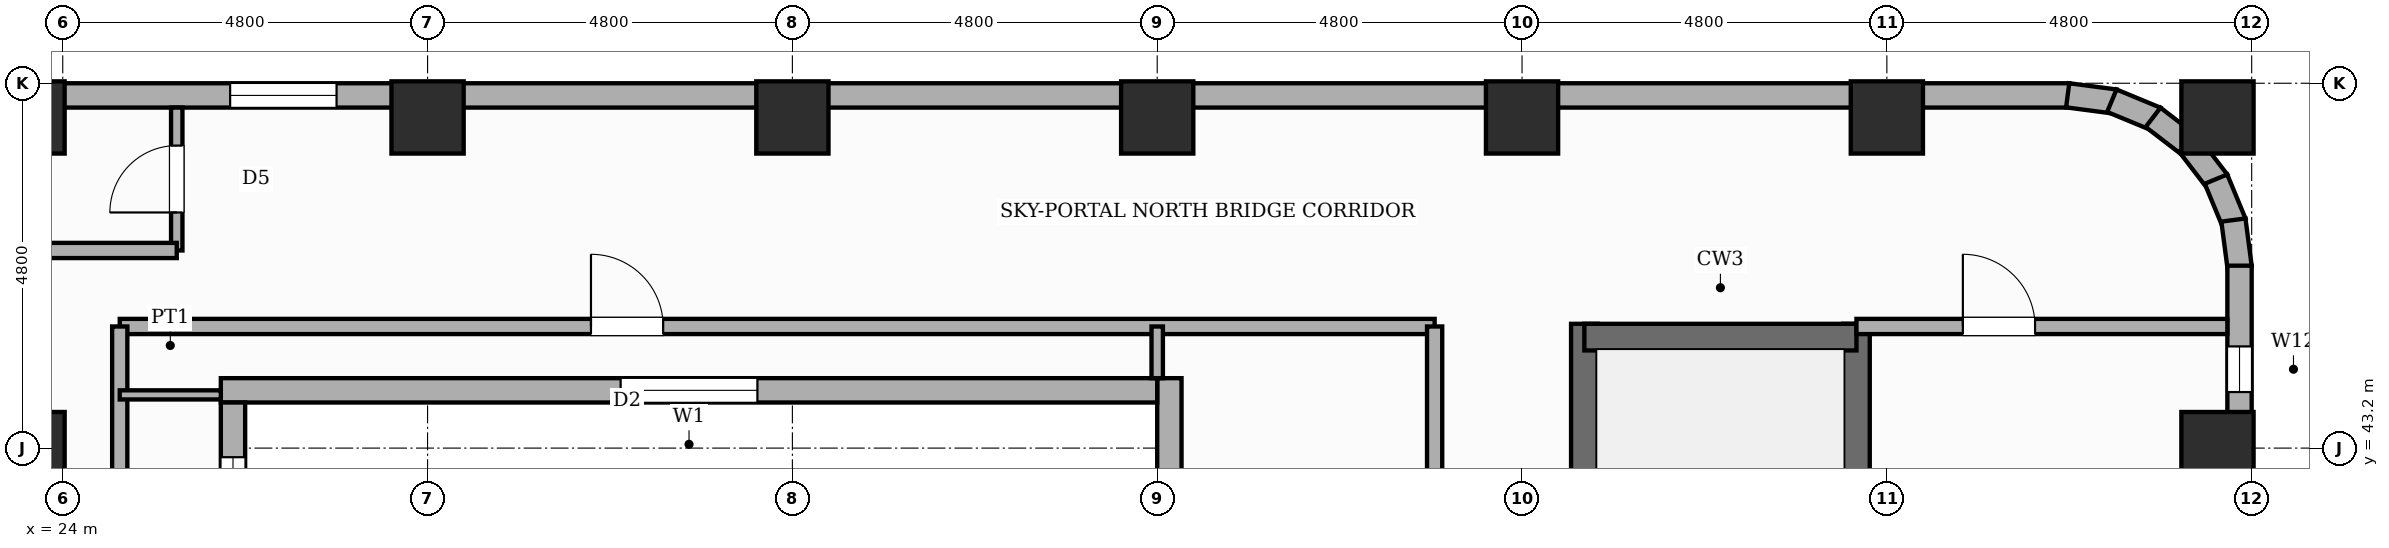
"""IFC4 building model, lengths in metres.
Left out: names, types, materials, properties, quantities, classifications, styles, units other than length and angle.
Written with IfcOpenShell. Run it as: python <this file> out.ifc"""

import sys

from ifc_helpers import new_model, si_unit, direction, frame, frame_2d, origin, origin_2d, place, context, subcontext, project, spatial, rectangle, extrude, element, fill, save


model = new_model("IFC4")
c1 = context("Model", 3, precision=1e-05, world=origin(), true_north=direction((0.0, 1.0)))
c2 = subcontext(c1, "Body", "Model", "MODEL_VIEW")
j1 = project(units=[si_unit("LENGTHUNIT", "METRE"), si_unit("PLANEANGLEUNIT", "RADIAN")], contexts=[c1])
p1 = place(None, origin())
s1 = spatial("IfcSite", under=j1, at=p1, CompositionType="ELEMENT")
p2 = place(p1, origin())
s2 = spatial("IfcBuilding", under=s1, at=p2, CompositionType="ELEMENT")
p3 = place(p2, frame((0.0, 0.0, 107.2)))
s3 = spatial("IfcBuildingStorey", under=s2, at=p3, CompositionType="ELEMENT", Elevation=107.2)
p4 = place(p3, frame((44.02, 35.865, 0.0), z_axis=(0.0, 0.0, 1.0), x_axis=(0.0, 1.0, 0.0)))
e1 = element("IfcWall", 1, at=p4, inside=s3, PredefinedType="SHEAR", context=c2, shape_type="SweptSolid", body=[
    extrude(rectangle(XDim=8.97, YDim=0.35, at=frame_2d((4.485, 0.0))), origin(), (0.0, 0.0, 1.0), 3.6),
])
p5 = place(p4, frame((0.65, 0.0, 0.0)))
e2 = element("IfcOpeningElement", 2, at=p5, cuts=e1, PredefinedType="OPENING", context=c2, shape_type="SweptSolid", body=[
    extrude(rectangle(XDim=0.95, YDim=2.1, at=frame_2d((0.475, 1.05))), frame((0.0, 0.185, 0.0), z_axis=(0.0, -1.0, 0.0), x_axis=(1.0, 0.0, 0.0)), (0.0, 0.0, 1.0), 0.37),
])
p6 = place(p3, frame((47.6, 35.865, 0.0), z_axis=(0.0, 0.0, 1.0), x_axis=(0.0, 1.0, 0.0)))
e3 = element("IfcWall", 3, at=p6, inside=s3, PredefinedType="SHEAR", context=c2, shape_type="SweptSolid", body=[
    extrude(rectangle(XDim=8.97, YDim=0.35, at=frame_2d((4.485, 0.0))), origin(), (0.0, 0.0, 1.0), 3.6),
])
p7 = place(p3, frame((44.02, 44.66, 0.0), z_axis=(0.0, 0.0, 1.0), x_axis=(1.0, 0.0, 0.0)))
e4 = element("IfcWall", 4, at=p7, inside=s3, PredefinedType="SHEAR", context=c2, shape_type="SweptSolid", body=[
    extrude(rectangle(XDim=3.58, YDim=0.35, at=frame_2d((1.79, 0.0))), origin(), (0.0, 0.0, 1.0), 3.6),
])
for number, where, z_axis, x_axis in (
    (5, (23.55, 43.2, 0.0), (0.0, 0.0, 1.0), (1.0, 0.0, 0.0)),
    (6, (23.55, 47.55, 0.0), (0.0, 0.0, 1.0), (1.0, 0.0, 0.0)),
    (7, (28.8, 47.55, 0.0), (0.0, 0.0, 1.0), (1.0, 0.0, 0.0)),
    (8, (33.6, 47.55, 0.0), (0.0, 0.0, 1.0), (1.0, 0.0, 0.0)),
    (9, (38.4, 47.55, 0.0), (0.0, 0.0, 1.0), (1.0, 0.0, 0.0)),
    (10, (43.2, 47.55, 0.0), (0.0, 0.0, 1.0), (1.0, 0.0, 0.0)),
    (11, (48.0, 47.55, 0.0), (0.0, 0.0, 1.0), (1.0, 0.0, 0.0)),
    (12, (52.35, 43.2, 0.0), (0.0, 0.0, 1.0), (1.0, 0.0, 0.0)),
    (13, (52.35, 47.55, 0.0), (0.0, 0.0, 1.0), (1.0, 0.0, 0.0)),
):
    element("IfcColumn", number, at=place(p3, frame(where, z_axis=z_axis, x_axis=x_axis)), inside=s3, PredefinedType="COLUMN", context=c2, shape_type="SweptSolid", body=[
        extrude(rectangle(XDim=0.95, YDim=0.95, at=origin_2d()), origin(), (0.0, 0.0, 1.0), 3.6),
    ])
p8 = place(p3, frame((7.2, 47.84, 0.0), z_axis=(0.0, 0.0, 1.0), x_axis=(1.0, 0.0, 0.0)))
e14 = element("IfcWall", 14, at=p8, inside=s3, PredefinedType="STANDARD", context=c2, shape_type="SweptSolid", body=[
    extrude(rectangle(XDim=43.2, YDim=0.32, at=frame_2d((21.6, 0.0))), origin(), (0.0, 0.0, 1.0), 2.54),
])
p9 = place(p8, frame((19.002, 0.0, 0.65)))
e15 = element("IfcOpeningElement", 15, at=p9, cuts=e14, PredefinedType="OPENING", context=c2, shape_type="SweptSolid", body=[
    extrude(rectangle(XDim=1.4, YDim=1.1, at=frame_2d((0.7, 0.55))), frame((0.0, 0.17, 0.0), z_axis=(0.0, -1.0, 0.0), x_axis=(1.0, 0.0, 0.0)), (0.0, 0.0, 1.0), 0.34),
])
p10 = place(p8, frame((0.282, 0.0, 0.65)))
e16 = element("IfcOpeningElement", 16, at=p10, cuts=e14, PredefinedType="OPENING", context=c2, shape_type="SweptSolid", body=[
    extrude(rectangle(XDim=1.4, YDim=1.1, at=frame_2d((0.7, 0.55))), frame((0.0, 0.17, 0.0), z_axis=(0.0, -1.0, 0.0), x_axis=(1.0, 0.0, 0.0)), (0.0, 0.0, 1.0), 0.34),
])
p11 = place(p8, frame((9.853, 0.0, 0.65)))
e17 = element("IfcOpeningElement", 17, at=p11, cuts=e14, PredefinedType="OPENING", context=c2, shape_type="SweptSolid", body=[
    extrude(rectangle(XDim=1.4, YDim=1.1, at=frame_2d((0.7, 0.55))), frame((0.0, 0.17, 0.0), z_axis=(0.0, -1.0, 0.0), x_axis=(1.0, 0.0, 0.0)), (0.0, 0.0, 1.0), 0.34),
])
for number, where, z_axis, x_axis in (
    (18, (50.379, 47.841, 0.0), (0.0, 0.0, 1.0), (0.991, -0.131, 0.0)),
    (19, (50.96, 47.771, 0.0), (0.0, 0.0, 1.0), (0.924, -0.383, 0.0)),
    (20, (51.503, 47.552, 0.0), (0.0, 0.0, 1.0), (0.793, -0.609, 0.0)),
    (21, (51.97, 47.2, 0.0), (0.0, 0.0, 1.0), (0.609, -0.793, 0.0)),
    (22, (52.331, 46.739, 0.0), (0.0, 0.0, 1.0), (0.382, -0.924, 0.0)),
    (23, (52.56, 46.2, 0.0), (0.0, 0.0, 1.0), (0.131, -0.991, 0.0)),
):
    element("IfcWall", number, at=place(p3, frame(where, z_axis=z_axis, x_axis=x_axis)), inside=s3, PredefinedType="STANDARD", context=c2, shape_type="SweptSolid", body=[
        extrude(rectangle(XDim=0.626, YDim=0.32, at=frame_2d((0.313, 0.0))), origin(), (0.0, 0.0, 1.0), 2.54),
    ])
p12 = place(p3, frame((52.64, 45.6, 0.0), z_axis=(0.0, 0.0, 1.0), x_axis=(0.0, -1.0, 0.0)))
e24 = element("IfcWall", 24, at=p12, inside=s3, PredefinedType="STANDARD", context=c2, shape_type="SweptSolid", body=[
    extrude(rectangle(XDim=14.4, YDim=0.32, at=frame_2d((7.2, 0.0))), origin(), (0.0, 0.0, 1.0), 2.54),
])
p13 = place(p12, frame((1.062, 0.0, 0.45)))
e25 = element("IfcOpeningElement", 25, at=p13, cuts=e24, PredefinedType="OPENING", context=c2, shape_type="SweptSolid", body=[
    extrude(rectangle(XDim=0.6, YDim=1.8, at=frame_2d((0.3, 0.9))), frame((0.0, 0.17, 0.0), z_axis=(0.0, -1.0, 0.0), x_axis=(1.0, 0.0, 0.0)), (0.0, 0.0, 1.0), 0.34),
])
p14 = place(p12, frame((9.452, 0.0, 0.65)))
e26 = element("IfcOpeningElement", 26, at=p14, cuts=e24, PredefinedType="OPENING", context=c2, shape_type="SweptSolid", body=[
    extrude(rectangle(XDim=1.4, YDim=1.1, at=frame_2d((0.7, 0.55))), frame((0.0, 0.17, 0.0), z_axis=(0.0, -1.0, 0.0), x_axis=(1.0, 0.0, 0.0)), (0.0, 0.0, 1.0), 0.34),
])
p15 = place(p3, frame((38.56, 28.8, 0.0), z_axis=(0.0, 0.0, 1.0), x_axis=(0.0, 1.0, 0.0)))
e27 = element("IfcWall", 27, at=p15, inside=s3, PredefinedType="STANDARD", context=c2, shape_type="SweptSolid", body=[
    extrude(rectangle(XDim=15.32, YDim=0.32, at=frame_2d((7.66, 0.0))), origin(), (0.0, 0.0, 1.0), 3.36),
])
p16 = place(p15, frame((9.89, 0.0, 0.8)))
e28 = element("IfcOpeningElement", 28, at=p16, cuts=e27, PredefinedType="OPENING", context=c2, shape_type="SweptSolid", body=[
    extrude(rectangle(XDim=1.8, YDim=2.1, at=frame_2d((0.9, 1.05))), frame((0.0, 0.17, 0.0), z_axis=(0.0, -1.0, 0.0), x_axis=(1.0, 0.0, 0.0)), (0.0, 0.0, 1.0), 0.34),
])
p17 = place(p15, frame((2.805, 0.0, 0.8)))
e29 = element("IfcOpeningElement", 29, at=p17, cuts=e27, PredefinedType="OPENING", context=c2, shape_type="SweptSolid", body=[
    extrude(rectangle(XDim=1.8, YDim=2.1, at=frame_2d((0.9, 1.05))), frame((0.0, 0.17, 0.0), z_axis=(0.0, -1.0, 0.0), x_axis=(1.0, 0.0, 0.0)), (0.0, 0.0, 1.0), 0.34),
])
p18 = place(p3, frame((38.4, 43.96, 0.0), z_axis=(0.0, 0.0, 1.0), x_axis=(-1.0, 0.0, 0.0)))
e30 = element("IfcWall", 30, at=p18, inside=s3, PredefinedType="STANDARD", context=c2, shape_type="SweptSolid", body=[
    extrude(rectangle(XDim=12.32, YDim=0.32, at=frame_2d((6.16, 0.0))), origin(), (0.0, 0.0, 1.0), 3.36),
])
p19 = place(p18, frame((5.26, 0.0, 0.8)))
e31 = element("IfcOpeningElement", 31, at=p19, cuts=e30, PredefinedType="OPENING", context=c2, shape_type="SweptSolid", body=[
    extrude(rectangle(XDim=1.8, YDim=2.1, at=frame_2d((0.9, 1.05))), frame((0.0, 0.17, 0.0), z_axis=(0.0, -1.0, 0.0), x_axis=(1.0, 0.0, 0.0)), (0.0, 0.0, 1.0), 0.34),
])
p20 = place(p3, frame((26.24, 43.8, 0.0), z_axis=(0.0, 0.0, 1.0), x_axis=(0.0, -1.0, 0.0)))
e32 = element("IfcWall", 32, at=p20, inside=s3, PredefinedType="STANDARD", context=c2, shape_type="SweptSolid", body=[
    extrude(rectangle(XDim=15.0, YDim=0.32, at=frame_2d((7.5, 0.0))), origin(), (0.0, 0.0, 1.0), 3.36),
])
p21 = place(p20, frame((7.665, 0.0, 0.8)))
e33 = element("IfcOpeningElement", 33, at=p21, cuts=e32, PredefinedType="OPENING", context=c2, shape_type="SweptSolid", body=[
    extrude(rectangle(XDim=1.8, YDim=2.1, at=frame_2d((0.9, 1.05))), frame((0.0, 0.17, 0.0), z_axis=(0.0, -1.0, 0.0), x_axis=(1.0, 0.0, 0.0)), (0.0, 0.0, 1.0), 0.34),
])
p22 = place(p20, frame((0.72, 0.0, 0.8)))
e34 = element("IfcOpeningElement", 34, at=p22, cuts=e32, PredefinedType="OPENING", context=c2, shape_type="SweptSolid", body=[
    extrude(rectangle(XDim=1.8, YDim=2.1, at=frame_2d((0.9, 1.05))), frame((0.0, 0.17, 0.0), z_axis=(0.0, -1.0, 0.0), x_axis=(1.0, 0.0, 0.0)), (0.0, 0.0, 1.0), 0.34),
])
p23 = place(p3, frame((25.5, 45.8, 0.0), z_axis=(0.0, 0.0, 1.0), x_axis=(0.0, 1.0, 0.0)))
e35 = element("IfcWall", 35, at=p23, inside=s3, PredefinedType="PARTITIONING", context=c2, shape_type="SweptSolid", body=[
    extrude(rectangle(XDim=1.88, YDim=0.15, at=frame_2d((0.94, 0.0))), origin(), (0.0, 0.0, 1.0), 3.36),
])
p24 = place(p23, frame((0.5, 0.0, 0.0)))
e36 = element("IfcOpeningElement", 36, at=p24, cuts=e35, PredefinedType="OPENING", context=c2, shape_type="SweptSolid", body=[
    extrude(rectangle(XDim=0.88, YDim=2.1, at=frame_2d((0.44, 1.05))), frame((0.0, 0.085, 0.0), z_axis=(0.0, -1.0, 0.0), x_axis=(1.0, 0.0, 0.0)), (0.0, 0.0, 1.0), 0.17),
])
p25 = place(p3, frame((22.75, 45.8, 0.0), z_axis=(0.0, 0.0, 1.0), x_axis=(1.0, 0.0, 0.0)))
e37 = element("IfcWall", 37, at=p25, inside=s3, PredefinedType="PARTITIONING", context=c2, shape_type="SweptSolid", body=[
    extrude(rectangle(XDim=2.75, YDim=0.2, at=frame_2d((1.375, 0.0))), origin(), (0.0, 0.0, 1.0), 3.36),
])
p26 = place(p3, frame((24.75, 44.8, 0.0), z_axis=(0.0, 0.0, 1.0), x_axis=(1.0, 0.0, 0.0)))
e38 = element("IfcWall", 38, at=p26, inside=s3, PredefinedType="PARTITIONING", context=c2, shape_type="SweptSolid", body=[
    extrude(rectangle(XDim=17.3, YDim=0.2, at=frame_2d((8.65, 0.0))), origin(), (0.0, 0.0, 1.0), 3.36),
])
p27 = place(p26, frame((6.2, 0.0, 0.0)))
e39 = element("IfcOpeningElement", 39, at=p27, cuts=e38, PredefinedType="OPENING", context=c2, shape_type="SweptSolid", body=[
    extrude(rectangle(XDim=0.95, YDim=2.15, at=frame_2d((0.475, 1.075))), frame((0.0, 0.11, 0.0), z_axis=(0.0, -1.0, 0.0), x_axis=(1.0, 0.0, 0.0)), (0.0, 0.0, 1.0), 0.22),
])
p28 = place(p3, frame((38.4, 44.12, 0.0), z_axis=(0.0, 0.0, 1.0), x_axis=(0.0, 1.0, 0.0)))
e40 = element("IfcWall", 40, at=p28, inside=s3, PredefinedType="PARTITIONING", context=c2, shape_type="SweptSolid", body=[
    extrude(rectangle(XDim=0.68, YDim=0.15, at=frame_2d((0.34, 0.0))), origin(), (0.0, 0.0, 1.0), 3.36),
])
p29 = place(p3, frame((47.6, 44.8, 0.0), z_axis=(0.0, 0.0, 1.0), x_axis=(1.0, 0.0, 0.0)))
e41 = element("IfcWall", 41, at=p29, inside=s3, PredefinedType="PARTITIONING", context=c2, shape_type="SweptSolid", body=[
    extrude(rectangle(XDim=4.88, YDim=0.2, at=frame_2d((2.44, 0.0))), origin(), (0.0, 0.0, 1.0), 3.36),
])
p30 = place(p29, frame((1.4, 0.0, 0.0)))
e42 = element("IfcOpeningElement", 42, at=p30, cuts=e41, PredefinedType="OPENING", context=c2, shape_type="SweptSolid", body=[
    extrude(rectangle(XDim=0.95, YDim=2.15, at=frame_2d((0.475, 1.075))), frame((0.0, 0.11, 0.0), z_axis=(0.0, -1.0, 0.0), x_axis=(1.0, 0.0, 0.0)), (0.0, 0.0, 1.0), 0.22),
])
p31 = place(p3, frame((24.75, 40.6, 0.0), z_axis=(0.0, 0.0, 1.0), x_axis=(0.0, 1.0, 0.0)))
e43 = element("IfcWall", 43, at=p31, inside=s3, PredefinedType="PARTITIONING", context=c2, shape_type="SweptSolid", body=[
    extrude(rectangle(XDim=4.2, YDim=0.2, at=frame_2d((2.1, 0.0))), origin(), (0.0, 0.0, 1.0), 3.36),
])
p32 = place(p31, frame((1.0, 0.0, 0.0)))
e44 = element("IfcOpeningElement", 44, at=p32, cuts=e43, PredefinedType="OPENING", context=c2, shape_type="SweptSolid", body=[
    extrude(rectangle(XDim=0.86, YDim=2.1, at=frame_2d((0.43, 1.05))), frame((0.0, 0.11, 0.0), z_axis=(0.0, -1.0, 0.0), x_axis=(1.0, 0.0, 0.0)), (0.0, 0.0, 1.0), 0.22),
])
p33 = place(p3, frame((24.75, 43.9, 0.0), z_axis=(0.0, 0.0, 1.0), x_axis=(1.0, 0.0, 0.0)))
e45 = element("IfcWall", 45, at=p33, inside=s3, PredefinedType="PARTITIONING", context=c2, shape_type="SweptSolid", body=[
    extrude(rectangle(XDim=1.33, YDim=0.12, at=frame_2d((0.665, 0.0))), origin(), (0.0, 0.0, 1.0), 3.36),
])
p34 = place(p3, frame((42.05, 36.05, 0.0), z_axis=(0.0, 0.0, 1.0), x_axis=(0.0, 1.0, 0.0)))
e46 = element("IfcWall", 46, at=p34, inside=s3, PredefinedType="PARTITIONING", context=c2, shape_type="SweptSolid", body=[
    extrude(rectangle(XDim=8.75, YDim=0.2, at=frame_2d((4.375, 0.0))), origin(), (0.0, 0.0, 1.0), 3.36),
])
p35 = place(p34, frame((3.2, 0.0, 0.0)))
e47 = element("IfcOpeningElement", 47, at=p35, cuts=e46, PredefinedType="OPENING", context=c2, shape_type="SweptSolid", body=[
    extrude(rectangle(XDim=0.95, YDim=2.15, at=frame_2d((0.475, 1.075))), frame((0.0, 0.11, 0.0), z_axis=(0.0, -1.0, 0.0), x_axis=(1.0, 0.0, 0.0)), (0.0, 0.0, 1.0), 0.22),
])
p36 = place(p9, origin())
e48 = element("IfcWindow", 48, at=p36, inside=s3, PartitioningType="SINGLE_PANEL", PredefinedType="WINDOW", context=c2, shape_type="SweptSolid", body=[
    extrude(rectangle(XDim=1.4, YDim=1.1, at=frame_2d((0.7, 0.55))), frame((0.0, 0.03, 0.0), z_axis=(0.0, -1.0, 0.0), x_axis=(1.0, 0.0, 0.0)), (0.0, 0.0, 1.0), 0.06),
])
fill(e15, e48)
p37 = place(p13, origin())
e49 = element("IfcWindow", 49, at=p37, inside=s3, PartitioningType="SINGLE_PANEL", PredefinedType="WINDOW", context=c2, shape_type="SweptSolid", body=[
    extrude(rectangle(XDim=0.6, YDim=1.8, at=frame_2d((0.3, 0.9))), frame((0.0, 0.03, 0.0), z_axis=(0.0, -1.0, 0.0), x_axis=(1.0, 0.0, 0.0)), (0.0, 0.0, 1.0), 0.06),
])
fill(e25, e49)
p38 = place(p19, origin())
e50 = element("IfcWindow", 50, at=p38, inside=s3, PartitioningType="SINGLE_PANEL", PredefinedType="WINDOW", context=c2, shape_type="SweptSolid", body=[
    extrude(rectangle(XDim=1.8, YDim=2.1, at=frame_2d((0.9, 1.05))), frame((0.0, 0.03, 0.0), z_axis=(0.0, -1.0, 0.0), x_axis=(1.0, 0.0, 0.0)), (0.0, 0.0, 1.0), 0.06),
])
fill(e31, e50)
p39 = place(p22, origin())
e51 = element("IfcWindow", 51, at=p39, inside=s3, PartitioningType="SINGLE_PANEL", PredefinedType="WINDOW", context=c2, shape_type="SweptSolid", body=[
    extrude(rectangle(XDim=1.8, YDim=2.1, at=frame_2d((0.9, 1.05))), frame((0.0, 0.03, 0.0), z_axis=(0.0, -1.0, 0.0), x_axis=(1.0, 0.0, 0.0)), (0.0, 0.0, 1.0), 0.06),
])
fill(e34, e51)
p40 = place(p24, origin())
e52 = element("IfcDoor", 52, at=p40, inside=s3, OperationType="SINGLE_SWING_LEFT", PredefinedType="DOOR", context=c2, shape_type="SweptSolid", body=[
    extrude(rectangle(XDim=0.88, YDim=2.1, at=frame_2d((0.44, 1.05))), frame((0.0, 0.025, 0.0), z_axis=(0.0, -1.0, 0.0), x_axis=(1.0, 0.0, 0.0)), (0.0, 0.0, 1.0), 0.05),
])
fill(e36, e52)
p41 = place(p27, origin())
e53 = element("IfcDoor", 53, at=p41, inside=s3, OperationType="SINGLE_SWING_LEFT", PredefinedType="DOOR", context=c2, shape_type="SweptSolid", body=[
    extrude(rectangle(XDim=0.95, YDim=2.15, at=frame_2d((0.475, 1.075))), frame((0.0, 0.025, 0.0), z_axis=(0.0, -1.0, 0.0), x_axis=(1.0, 0.0, 0.0)), (0.0, 0.0, 1.0), 0.05),
])
fill(e39, e53)
p42 = place(p30, origin())
e54 = element("IfcDoor", 54, at=p42, inside=s3, OperationType="SINGLE_SWING_LEFT", PredefinedType="DOOR", context=c2, shape_type="SweptSolid", body=[
    extrude(rectangle(XDim=0.95, YDim=2.15, at=frame_2d((0.475, 1.075))), frame((0.0, 0.025, 0.0), z_axis=(0.0, -1.0, 0.0), x_axis=(1.0, 0.0, 0.0)), (0.0, 0.0, 1.0), 0.05),
])
fill(e42, e54)
save(model, sys.argv[1])
